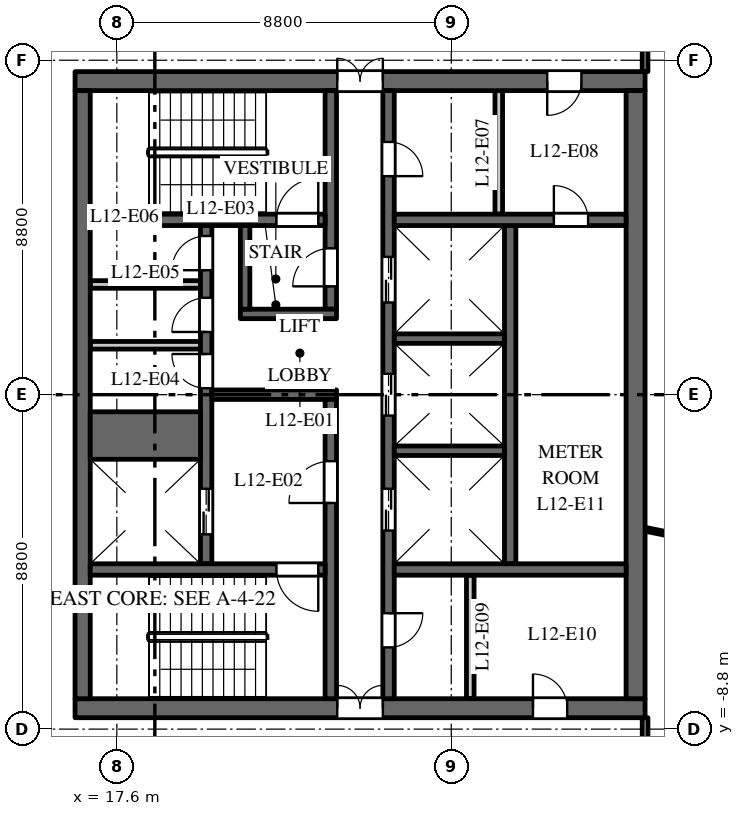
"""IFC4 building model, lengths in metres.
Left out: names, types, materials, properties, quantities, classifications, styles, units other than length and angle.
Written with IfcOpenShell. Run it as: python <this file> out.ifc"""

import sys

from ifc_helpers import new_model, si_unit, direction, frame, frame_2d, origin, place, context, subcontext, project, spatial, rectangle, extrude, element, fill, save


model = new_model("IFC4")
c1 = context("Model", 3, precision=1e-05, world=origin(), true_north=direction((0.0, 1.0)))
c2 = subcontext(c1, "Body", "Model", "MODEL_VIEW")
j1 = project(units=[si_unit("LENGTHUNIT", "METRE"), si_unit("PLANEANGLEUNIT", "RADIAN")], contexts=[c1])
p1 = place(None, origin())
s1 = spatial("IfcSite", under=j1, at=p1, CompositionType="ELEMENT")
p2 = place(p1, origin())
s2 = spatial("IfcBuilding", under=s1, at=p2, CompositionType="ELEMENT")
p3 = place(p2, frame((0.0, 0.0, 58.5)))
s3 = spatial("IfcBuildingStorey", under=s2, at=p3, CompositionType="ELEMENT", Elevation=58.5)
p4 = place(p3, frame((16.5, 8.25, 0.0), z_axis=(0.0, 0.0, 1.0), x_axis=(1.0, 0.0, 0.0)))
e1 = element("IfcWall", 1, at=p4, inside=s3, PredefinedType="SHEAR", context=c2, shape_type="SweptSolid", body=[
    extrude(rectangle(XDim=15.0, YDim=0.5, at=frame_2d((7.5, 0.0))), origin(), (0.0, 0.0, 1.0), 3.7),
])
p5 = place(p4, frame((6.9, 0.0, 0.0)))
e2 = element("IfcOpeningElement", 2, at=p5, cuts=e1, PredefinedType="OPENING", context=c2, shape_type="SweptSolid", body=[
    extrude(rectangle(XDim=1.2, YDim=2.1, at=frame_2d((0.6, 1.05))), frame((0.0, 0.26, 0.0), z_axis=(0.0, -1.0, 0.0), x_axis=(1.0, 0.0, 0.0)), (0.0, 0.0, 1.0), 0.52),
])
p6 = place(p4, frame((12.425, 0.0, 0.0)))
e3 = element("IfcOpeningElement", 3, at=p6, cuts=e1, PredefinedType="OPENING", context=c2, shape_type="SweptSolid", body=[
    extrude(rectangle(XDim=0.9, YDim=2.1, at=frame_2d((0.45, 1.05))), frame((0.0, 0.26, 0.0), z_axis=(0.0, -1.0, 0.0), x_axis=(1.0, 0.0, 0.0)), (0.0, 0.0, 1.0), 0.52),
])
p7 = place(p3, frame((16.5, -8.25, 0.0), z_axis=(0.0, 0.0, 1.0), x_axis=(1.0, 0.0, 0.0)))
e4 = element("IfcWall", 4, at=p7, inside=s3, PredefinedType="SHEAR", context=c2, shape_type="SweptSolid", body=[
    extrude(rectangle(XDim=15.0, YDim=0.5, at=frame_2d((7.5, 0.0))), origin(), (0.0, 0.0, 1.0), 3.7),
])
p8 = place(p7, frame((6.9, 0.0, 0.0)))
e5 = element("IfcOpeningElement", 5, at=p8, cuts=e4, PredefinedType="OPENING", context=c2, shape_type="SweptSolid", body=[
    extrude(rectangle(XDim=1.2, YDim=2.1, at=frame_2d((0.6, 1.05))), frame((0.0, 0.26, 0.0), z_axis=(0.0, -1.0, 0.0), x_axis=(1.0, 0.0, 0.0)), (0.0, 0.0, 1.0), 0.52),
])
p9 = place(p7, frame((12.05, 0.0, 0.0)))
e6 = element("IfcOpeningElement", 6, at=p9, cuts=e4, PredefinedType="OPENING", context=c2, shape_type="SweptSolid", body=[
    extrude(rectangle(XDim=0.9, YDim=2.1, at=frame_2d((0.45, 1.05))), frame((0.0, 0.26, 0.0), z_axis=(0.0, -1.0, 0.0), x_axis=(1.0, 0.0, 0.0)), (0.0, 0.0, 1.0), 0.52),
])
for number, where, z_axis, x_axis in (
    (7, (16.9, 1.3, 0.0), (0.0, 0.0, 1.0), (1.0, 0.0, 0.0)),
    (8, (16.9, 2.9, 0.0), (0.0, 0.0, 1.0), (1.0, 0.0, 0.0)),
):
    element("IfcWall", number, at=place(p3, frame(where, z_axis=z_axis, x_axis=x_axis)), inside=s3, PredefinedType="PARTITIONING", context=c2, shape_type="SweptSolid", body=[
        extrude(rectangle(XDim=2.9, YDim=0.2, at=frame_2d((1.45, 0.0))), origin(), (0.0, 0.0, 1.0), 3.7),
    ])
p10 = place(p3, frame((27.95, -4.45, 0.0), z_axis=(0.0, 0.0, 1.0), x_axis=(0.0, 1.0, 0.0)))
e9 = element("IfcWall", 9, at=p10, inside=s3, PredefinedType="SHEAR", context=c2, shape_type="SweptSolid", body=[
    extrude(rectangle(XDim=8.9, YDim=0.3, at=frame_2d((4.45, 0.0))), origin(), (0.0, 0.0, 1.0), 3.7),
])
p11 = place(p3, frame((19.95, -4.45, 0.0), z_axis=(0.0, 0.0, 1.0), x_axis=(0.0, 1.0, 0.0)))
e10 = element("IfcWall", 10, at=p11, inside=s3, PredefinedType="SHEAR", context=c2, shape_type="SweptSolid", body=[
    extrude(rectangle(XDim=8.9, YDim=0.3, at=frame_2d((4.45, 0.0))), origin(), (0.0, 0.0, 1.0), 3.7),
])
p12 = place(p11, frame((0.775, 0.0, 0.0)))
e11 = element("IfcOpeningElement", 11, at=p12, cuts=e10, PredefinedType="OPENING", context=c2, shape_type="SweptSolid", body=[
    extrude(rectangle(XDim=1.2, YDim=2.1, at=frame_2d((0.6, 1.05))), frame((0.0, 0.16, 0.0), z_axis=(0.0, -1.0, 0.0), x_axis=(1.0, 0.0, 0.0)), (0.0, 0.0, 1.0), 0.32),
])
p13 = place(p11, frame((4.62, 0.0, 0.0)))
e12 = element("IfcOpeningElement", 12, at=p13, cuts=e10, PredefinedType="OPENING", context=c2, shape_type="SweptSolid", body=[
    extrude(rectangle(XDim=0.9, YDim=2.1, at=frame_2d((0.45, 1.05))), frame((0.0, 0.16, 0.0), z_axis=(0.0, -1.0, 0.0), x_axis=(1.0, 0.0, 0.0)), (0.0, 0.0, 1.0), 0.32),
])
p14 = place(p11, frame((6.1, 0.0, 0.0)))
e13 = element("IfcOpeningElement", 13, at=p14, cuts=e10, PredefinedType="OPENING", context=c2, shape_type="SweptSolid", body=[
    extrude(rectangle(XDim=0.9, YDim=2.1, at=frame_2d((0.45, 1.05))), frame((0.0, 0.16, 0.0), z_axis=(0.0, -1.0, 0.0), x_axis=(1.0, 0.0, 0.0)), (0.0, 0.0, 1.0), 0.32),
])
p15 = place(p11, frame((7.725, 0.0, 0.0)))
e14 = element("IfcOpeningElement", 14, at=p15, cuts=e10, PredefinedType="OPENING", context=c2, shape_type="SweptSolid", body=[
    extrude(rectangle(XDim=0.9, YDim=2.1, at=frame_2d((0.45, 1.05))), frame((0.0, 0.16, 0.0), z_axis=(0.0, -1.0, 0.0), x_axis=(1.0, 0.0, 0.0)), (0.0, 0.0, 1.0), 0.32),
])
p16 = place(p3, frame((24.75, -8.0, 0.0), z_axis=(0.0, 0.0, 1.0), x_axis=(0.0, 1.0, 0.0)))
e15 = element("IfcWall", 15, at=p16, inside=s3, PredefinedType="SHEAR", context=c2, shape_type="SweptSolid", body=[
    extrude(rectangle(XDim=16.0, YDim=0.3, at=frame_2d((8.0, 0.0))), origin(), (0.0, 0.0, 1.0), 3.7),
])
p17 = place(p16, frame((4.425, 0.0, 0.0)))
e16 = element("IfcOpeningElement", 16, at=p17, cuts=e15, PredefinedType="OPENING", context=c2, shape_type="SweptSolid", body=[
    extrude(rectangle(XDim=1.1, YDim=2.1, at=frame_2d((0.55, 1.05))), frame((0.0, 0.16, 0.0), z_axis=(0.0, -1.0, 0.0), x_axis=(1.0, 0.0, 0.0)), (0.0, 0.0, 1.0), 0.32),
])
p18 = place(p16, frame((7.45, 0.0, 0.0)))
e17 = element("IfcOpeningElement", 17, at=p18, cuts=e15, PredefinedType="OPENING", context=c2, shape_type="SweptSolid", body=[
    extrude(rectangle(XDim=1.1, YDim=2.1, at=frame_2d((0.55, 1.05))), frame((0.0, 0.16, 0.0), z_axis=(0.0, -1.0, 0.0), x_axis=(1.0, 0.0, 0.0)), (0.0, 0.0, 1.0), 0.32),
])
p19 = place(p16, frame((10.425, 0.0, 0.0)))
e18 = element("IfcOpeningElement", 18, at=p19, cuts=e15, PredefinedType="OPENING", context=c2, shape_type="SweptSolid", body=[
    extrude(rectangle(XDim=1.2, YDim=2.1, at=frame_2d((0.6, 1.05))), frame((0.0, 0.16, 0.0), z_axis=(0.0, -1.0, 0.0), x_axis=(1.0, 0.0, 0.0)), (0.0, 0.0, 1.0), 0.32),
])
p20 = place(p16, frame((13.75, 0.0, 0.0)))
e19 = element("IfcOpeningElement", 19, at=p20, cuts=e15, PredefinedType="OPENING", context=c2, shape_type="SweptSolid", body=[
    extrude(rectangle(XDim=0.9, YDim=2.1, at=frame_2d((0.45, 1.05))), frame((0.0, 0.16, 0.0), z_axis=(0.0, -1.0, 0.0), x_axis=(1.0, 0.0, 0.0)), (0.0, 0.0, 1.0), 0.32),
])
p21 = place(p16, frame((1.35, 0.0, 0.0)))
e20 = element("IfcOpeningElement", 20, at=p21, cuts=e15, PredefinedType="OPENING", context=c2, shape_type="SweptSolid", body=[
    extrude(rectangle(XDim=0.9, YDim=2.1, at=frame_2d((0.45, 1.05))), frame((0.0, 0.16, 0.0), z_axis=(0.0, -1.0, 0.0), x_axis=(1.0, 0.0, 0.0)), (0.0, 0.0, 1.0), 0.32),
])
p22 = place(p3, frame((20.1, 0.0, 0.0), z_axis=(0.0, 0.0, 1.0), x_axis=(1.0, 0.0, 0.0)))
e21 = element("IfcWall", 21, at=p22, inside=s3, PredefinedType="SHEAR", context=c2, shape_type="SweptSolid", body=[
    extrude(rectangle(XDim=3.28, YDim=0.25, at=frame_2d((1.64, 0.0))), origin(), (0.0, 0.0, 1.0), 3.7),
])
p23 = place(p3, frame((16.7, -8.0, 0.0), z_axis=(0.0, 0.0, 1.0), x_axis=(0.0, 1.0, 0.0)))
e22 = element("IfcWall", 22, at=p23, inside=s3, PredefinedType="SHEAR", context=c2, shape_type="SweptSolid", body=[
    extrude(rectangle(XDim=16.0, YDim=0.4, at=frame_2d((8.0, 0.0))), origin(), (0.0, 0.0, 1.0), 3.7),
])
p24 = place(p3, frame((31.25, -8.0, 0.0), z_axis=(0.0, 0.0, 1.0), x_axis=(0.0, 1.0, 0.0)))
e23 = element("IfcWall", 23, at=p24, inside=s3, PredefinedType="SHEAR", context=c2, shape_type="SweptSolid", body=[
    extrude(rectangle(XDim=16.0, YDim=0.5, at=frame_2d((8.0, 0.0))), origin(), (0.0, 0.0, 1.0), 3.7),
])
p25 = place(p3, frame((24.9, 4.6, 0.0), z_axis=(0.0, 0.0, 1.0), x_axis=(1.0, 0.0, 0.0)))
e24 = element("IfcWall", 24, at=p25, inside=s3, PredefinedType="SHEAR", context=c2, shape_type="SweptSolid", body=[
    extrude(rectangle(XDim=6.1, YDim=0.3, at=frame_2d((3.05, 0.0))), origin(), (0.0, 0.0, 1.0), 3.7),
])
p26 = place(p25, frame((4.2, 0.0, 0.0)))
e25 = element("IfcOpeningElement", 25, at=p26, cuts=e24, PredefinedType="OPENING", context=c2, shape_type="SweptSolid", body=[
    extrude(rectangle(XDim=0.9, YDim=2.1, at=frame_2d((0.45, 1.05))), frame((0.0, 0.16, 0.0), z_axis=(0.0, -1.0, 0.0), x_axis=(1.0, 0.0, 0.0)), (0.0, 0.0, 1.0), 0.32),
])
for number, where, z_axis, x_axis in (
    (26, (27.65, 4.75, 0.0), (0.0, 0.0, 1.0), (0.0, 1.0, 0.0)),
    (27, (26.9, -8.0, 0.0), (0.0, 0.0, 1.0), (0.0, 1.0, 0.0)),
):
    element("IfcWall", number, at=place(p3, frame(where, z_axis=z_axis, x_axis=x_axis)), inside=s3, PredefinedType="PARTITIONING", context=c2, shape_type="SweptSolid", body=[
        extrude(rectangle(XDim=3.25, YDim=0.2, at=frame_2d((1.625, 0.0))), origin(), (0.0, 0.0, 1.0), 3.7),
    ])
p27 = place(p3, frame((24.9, -4.6, 0.0), z_axis=(0.0, 0.0, 1.0), x_axis=(1.0, 0.0, 0.0)))
e28 = element("IfcWall", 28, at=p27, inside=s3, PredefinedType="SHEAR", context=c2, shape_type="SweptSolid", body=[
    extrude(rectangle(XDim=6.1, YDim=0.3, at=frame_2d((3.05, 0.0))), origin(), (0.0, 0.0, 1.0), 3.7),
])
p28 = place(p3, frame((16.9, -1.075, 0.0), z_axis=(0.0, 0.0, 1.0), x_axis=(1.0, 0.0, 0.0)))
e29 = element("IfcWall", 29, at=p28, inside=s3, PredefinedType="SHEAR", context=c2, shape_type="SweptSolid", body=[
    extrude(rectangle(XDim=2.9, YDim=1.25, at=frame_2d((1.45, 0.0))), origin(), (0.0, 0.0, 1.0), 3.7),
])
for number, where, z_axis, x_axis in (
    (30, (24.9, -1.475, 0.0), (0.0, 0.0, 1.0), (1.0, 0.0, 0.0)),
    (31, (24.9, 1.475, 0.0), (0.0, 0.0, 1.0), (1.0, 0.0, 0.0)),
):
    element("IfcWall", number, at=place(p3, frame(where, z_axis=z_axis, x_axis=x_axis)), inside=s3, PredefinedType="SHEAR", context=c2, shape_type="SweptSolid", body=[
        extrude(rectangle(XDim=2.9, YDim=0.25, at=frame_2d((1.45, 0.0))), origin(), (0.0, 0.0, 1.0), 3.7),
    ])
p29 = place(p3, frame((23.23, 2.25, 0.0), z_axis=(0.0, 0.0, 1.0), x_axis=(0.0, 1.0, 0.0)))
e32 = element("IfcWall", 32, at=p29, inside=s3, PredefinedType="SHEAR", context=c2, shape_type="SweptSolid", body=[
    extrude(rectangle(XDim=5.75, YDim=0.3, at=frame_2d((2.875, 0.0))), origin(), (0.0, 0.0, 1.0), 3.7),
])
p30 = place(p29, frame((0.6, 0.0, 0.0)))
e33 = element("IfcOpeningElement", 33, at=p30, cuts=e32, PredefinedType="OPENING", context=c2, shape_type="SweptSolid", body=[
    extrude(rectangle(XDim=1.0, YDim=2.1, at=frame_2d((0.5, 1.05))), frame((0.0, 0.16, 0.0), z_axis=(0.0, -1.0, 0.0), x_axis=(1.0, 0.0, 0.0)), (0.0, 0.0, 1.0), 0.32),
])
p31 = place(p3, frame((23.23, -8.0, 0.0), z_axis=(0.0, 0.0, 1.0), x_axis=(0.0, 1.0, 0.0)))
e34 = element("IfcWall", 34, at=p31, inside=s3, PredefinedType="SHEAR", context=c2, shape_type="SweptSolid", body=[
    extrude(rectangle(XDim=7.875, YDim=0.3, at=frame_2d((3.938, 0.0))), origin(), (0.0, 0.0, 1.0), 3.7),
])
p32 = place(p31, frame((5.15, 0.0, 0.0)))
e35 = element("IfcOpeningElement", 35, at=p32, cuts=e34, PredefinedType="OPENING", context=c2, shape_type="SweptSolid", body=[
    extrude(rectangle(XDim=1.1, YDim=2.1, at=frame_2d((0.55, 1.05))), frame((0.0, 0.16, 0.0), z_axis=(0.0, -1.0, 0.0), x_axis=(1.0, 0.0, 0.0)), (0.0, 0.0, 1.0), 0.32),
])
p33 = place(p3, frame((16.9, 4.6, 0.0), z_axis=(0.0, 0.0, 1.0), x_axis=(1.0, 0.0, 0.0)))
e36 = element("IfcWall", 36, at=p33, inside=s3, PredefinedType="SHEAR", context=c2, shape_type="SweptSolid", body=[
    extrude(rectangle(XDim=6.18, YDim=0.3, at=frame_2d((3.09, 0.0))), origin(), (0.0, 0.0, 1.0), 3.7),
])
p34 = place(p33, frame((4.9, 0.0, 0.0)))
e37 = element("IfcOpeningElement", 37, at=p34, cuts=e36, PredefinedType="OPENING", context=c2, shape_type="SweptSolid", body=[
    extrude(rectangle(XDim=1.1, YDim=2.1, at=frame_2d((0.55, 1.05))), frame((0.0, 0.16, 0.0), z_axis=(0.0, -1.0, 0.0), x_axis=(1.0, 0.0, 0.0)), (0.0, 0.0, 1.0), 0.32),
])
p35 = place(p3, frame((16.9, -4.6, 0.0), z_axis=(0.0, 0.0, 1.0), x_axis=(1.0, 0.0, 0.0)))
e38 = element("IfcWall", 38, at=p35, inside=s3, PredefinedType="SHEAR", context=c2, shape_type="SweptSolid", body=[
    extrude(rectangle(XDim=6.18, YDim=0.3, at=frame_2d((3.09, 0.0))), origin(), (0.0, 0.0, 1.0), 3.7),
])
p36 = place(p35, frame((4.9, 0.0, 0.0)))
e39 = element("IfcOpeningElement", 39, at=p36, cuts=e38, PredefinedType="OPENING", context=c2, shape_type="SweptSolid", body=[
    extrude(rectangle(XDim=1.1, YDim=2.1, at=frame_2d((0.55, 1.05))), frame((0.0, 0.16, 0.0), z_axis=(0.0, -1.0, 0.0), x_axis=(1.0, 0.0, 0.0)), (0.0, 0.0, 1.0), 0.32),
])
p37 = place(p3, frame((20.85, 2.125, 0.0), z_axis=(0.0, 0.0, 1.0), x_axis=(1.0, 0.0, 0.0)))
e40 = element("IfcWall", 40, at=p37, inside=s3, PredefinedType="SHEAR", context=c2, shape_type="SweptSolid", body=[
    extrude(rectangle(XDim=2.53, YDim=0.25, at=frame_2d((1.265, 0.0))), origin(), (0.0, 0.0, 1.0), 3.7),
])
p38 = place(p3, frame((20.975, 2.25, 0.0), z_axis=(0.0, 0.0, 1.0), x_axis=(0.0, 1.0, 0.0)))
e41 = element("IfcWall", 41, at=p38, inside=s3, PredefinedType="SHEAR", context=c2, shape_type="SweptSolid", body=[
    extrude(rectangle(XDim=2.2, YDim=0.25, at=frame_2d((1.1, 0.0))), origin(), (0.0, 0.0, 1.0), 3.7),
])
p39 = place(p3, frame((31.5, -10.7, 0.0), z_axis=(0.0, 0.0, 1.0), x_axis=(0.0, 1.0, 0.0)))
e42 = element("IfcWall", 42, at=p39, inside=s3, PredefinedType="PARTITIONING", context=c2, shape_type="SweptSolid", body=[
    extrude(rectangle(XDim=2.2, YDim=0.15, at=frame_2d((1.1, 0.0))), origin(), (0.0, 0.0, 1.0), 2.85),
])
p40 = place(p3, frame((31.5, -3.542, 0.0), z_axis=(0.0, 0.0, 1.0), x_axis=(0.980357474535, -0.197228857227, 0.0)))
e43 = element("IfcWall", 43, at=p40, inside=s3, PredefinedType="PARTITIONING", context=c2, shape_type="SweptSolid", body=[
    extrude(rectangle(XDim=4.092, YDim=0.1, at=frame_2d((2.046, 0.0))), origin(), (0.0, 0.0, 1.0), 2.85),
])
p41 = place(p3, frame((31.5, 8.5, 0.0), z_axis=(0.0, 0.0, 1.0), x_axis=(0.0, 1.0, 0.0)))
e44 = element("IfcWall", 44, at=p41, inside=s3, PredefinedType="PARTITIONING", context=c2, shape_type="SweptSolid", body=[
    extrude(rectangle(XDim=2.2, YDim=0.15, at=frame_2d((1.1, 0.0))), origin(), (0.0, 0.0, 1.0), 2.85),
])
p42 = place(p41, frame((0.65, 0.0, 0.0)))
e45 = element("IfcOpeningElement", 45, at=p42, cuts=e44, PredefinedType="OPENING", context=c2, shape_type="SweptSolid", body=[
    extrude(rectangle(XDim=1.0, YDim=2.1, at=frame_2d((0.5, 1.05))), frame((0.0, 0.085, 0.0), z_axis=(0.0, -1.0, 0.0), x_axis=(1.0, 0.0, 0.0)), (0.0, 0.0, 1.0), 0.17),
])
p43 = place(p12, origin())
e46 = element("IfcDoor", 46, at=p43, inside=s3, OperationType="DOUBLE_DOOR_SLIDING", PredefinedType="DOOR", context=c2, shape_type="SweptSolid", body=[
    extrude(rectangle(XDim=1.2, YDim=2.1, at=frame_2d((0.6, 1.05))), frame((0.0, 0.025, 0.0), z_axis=(0.0, -1.0, 0.0), x_axis=(1.0, 0.0, 0.0)), (0.0, 0.0, 1.0), 0.05),
])
fill(e11, e46)
p44 = place(p17, origin())
e47 = element("IfcDoor", 47, at=p44, inside=s3, OperationType="DOUBLE_DOOR_SLIDING", PredefinedType="DOOR", context=c2, shape_type="SweptSolid", body=[
    extrude(rectangle(XDim=1.1, YDim=2.1, at=frame_2d((0.55, 1.05))), frame((0.0, 0.025, 0.0), z_axis=(0.0, -1.0, 0.0), x_axis=(1.0, 0.0, 0.0)), (0.0, 0.0, 1.0), 0.05),
])
fill(e16, e47)
p45 = place(p18, origin())
e48 = element("IfcDoor", 48, at=p45, inside=s3, OperationType="DOUBLE_DOOR_SLIDING", PredefinedType="DOOR", context=c2, shape_type="SweptSolid", body=[
    extrude(rectangle(XDim=1.1, YDim=2.1, at=frame_2d((0.55, 1.05))), frame((0.0, 0.025, 0.0), z_axis=(0.0, -1.0, 0.0), x_axis=(1.0, 0.0, 0.0)), (0.0, 0.0, 1.0), 0.05),
])
fill(e17, e48)
p46 = place(p19, origin())
e49 = element("IfcDoor", 49, at=p46, inside=s3, OperationType="DOUBLE_DOOR_SLIDING", PredefinedType="DOOR", context=c2, shape_type="SweptSolid", body=[
    extrude(rectangle(XDim=1.2, YDim=2.1, at=frame_2d((0.6, 1.05))), frame((0.0, 0.025, 0.0), z_axis=(0.0, -1.0, 0.0), x_axis=(1.0, 0.0, 0.0)), (0.0, 0.0, 1.0), 0.05),
])
fill(e18, e49)
p47 = place(p34, origin())
e50 = element("IfcDoor", 50, at=p47, inside=s3, OperationType="SINGLE_SWING_LEFT", PredefinedType="DOOR", context=c2, shape_type="SweptSolid", body=[
    extrude(rectangle(XDim=1.1, YDim=2.1, at=frame_2d((0.55, 1.05))), frame((0.0, 0.025, 0.0), z_axis=(0.0, -1.0, 0.0), x_axis=(1.0, 0.0, 0.0)), (0.0, 0.0, 1.0), 0.05),
])
fill(e37, e50)
p48 = place(p36, origin())
e51 = element("IfcDoor", 51, at=p48, inside=s3, OperationType="SINGLE_SWING_RIGHT", PredefinedType="DOOR", context=c2, shape_type="SweptSolid", body=[
    extrude(rectangle(XDim=1.1, YDim=2.1, at=frame_2d((0.55, 1.05))), frame((0.0, 0.025, 0.0), z_axis=(0.0, -1.0, 0.0), x_axis=(1.0, 0.0, 0.0)), (0.0, 0.0, 1.0), 0.05),
])
fill(e39, e51)
p49 = place(p32, origin())
e52 = element("IfcDoor", 52, at=p49, inside=s3, OperationType="SINGLE_SWING_RIGHT", PredefinedType="DOOR", context=c2, shape_type="SweptSolid", body=[
    extrude(rectangle(XDim=1.1, YDim=2.1, at=frame_2d((0.55, 1.05))), frame((0.0, 0.025, 0.0), z_axis=(0.0, -1.0, 0.0), x_axis=(1.0, 0.0, 0.0)), (0.0, 0.0, 1.0), 0.05),
])
fill(e35, e52)
p50 = place(p30, origin())
e53 = element("IfcDoor", 53, at=p50, inside=s3, OperationType="SINGLE_SWING_RIGHT", PredefinedType="DOOR", context=c2, shape_type="SweptSolid", body=[
    extrude(rectangle(XDim=1.0, YDim=2.1, at=frame_2d((0.5, 1.05))), frame((0.0, 0.025, 0.0), z_axis=(0.0, -1.0, 0.0), x_axis=(1.0, 0.0, 0.0)), (0.0, 0.0, 1.0), 0.05),
])
fill(e33, e53)
p51 = place(p5, origin())
e54 = element("IfcDoor", 54, at=p51, inside=s3, OperationType="DOUBLE_DOOR_DOUBLE_SWING", PredefinedType="DOOR", context=c2, shape_type="SweptSolid", body=[
    extrude(rectangle(XDim=1.2, YDim=2.1, at=frame_2d((0.6, 1.05))), frame((0.0, 0.025, 0.0), z_axis=(0.0, -1.0, 0.0), x_axis=(1.0, 0.0, 0.0)), (0.0, 0.0, 1.0), 0.05),
])
fill(e2, e54)
p52 = place(p8, origin())
e55 = element("IfcDoor", 55, at=p52, inside=s3, OperationType="DOUBLE_DOOR_DOUBLE_SWING", PredefinedType="DOOR", context=c2, shape_type="SweptSolid", body=[
    extrude(rectangle(XDim=1.2, YDim=2.1, at=frame_2d((0.6, 1.05))), frame((0.0, 0.025, 0.0), z_axis=(0.0, -1.0, 0.0), x_axis=(1.0, 0.0, 0.0)), (0.0, 0.0, 1.0), 0.05),
])
fill(e5, e55)
p53 = place(p13, origin())
e56 = element("IfcDoor", 56, at=p53, inside=s3, OperationType="SINGLE_SWING_LEFT", PredefinedType="DOOR", context=c2, shape_type="SweptSolid", body=[
    extrude(rectangle(XDim=0.9, YDim=2.1, at=frame_2d((0.45, 1.05))), frame((0.0, 0.025, 0.0), z_axis=(0.0, -1.0, 0.0), x_axis=(1.0, 0.0, 0.0)), (0.0, 0.0, 1.0), 0.05),
])
fill(e12, e56)
p54 = place(p14, origin())
e57 = element("IfcDoor", 57, at=p54, inside=s3, OperationType="SINGLE_SWING_RIGHT", PredefinedType="DOOR", context=c2, shape_type="SweptSolid", body=[
    extrude(rectangle(XDim=0.9, YDim=2.1, at=frame_2d((0.45, 1.05))), frame((0.0, 0.025, 0.0), z_axis=(0.0, -1.0, 0.0), x_axis=(1.0, 0.0, 0.0)), (0.0, 0.0, 1.0), 0.05),
])
fill(e13, e57)
p55 = place(p15, origin())
e58 = element("IfcDoor", 58, at=p55, inside=s3, OperationType="SINGLE_SWING_RIGHT", PredefinedType="DOOR", context=c2, shape_type="SweptSolid", body=[
    extrude(rectangle(XDim=0.9, YDim=2.1, at=frame_2d((0.45, 1.05))), frame((0.0, 0.025, 0.0), z_axis=(0.0, -1.0, 0.0), x_axis=(1.0, 0.0, 0.0)), (0.0, 0.0, 1.0), 0.05),
])
fill(e14, e58)
p56 = place(p20, origin())
e59 = element("IfcDoor", 59, at=p56, inside=s3, OperationType="SINGLE_SWING_LEFT", PredefinedType="DOOR", context=c2, shape_type="SweptSolid", body=[
    extrude(rectangle(XDim=0.9, YDim=2.1, at=frame_2d((0.45, 1.05))), frame((0.0, 0.025, 0.0), z_axis=(0.0, -1.0, 0.0), x_axis=(1.0, 0.0, 0.0)), (0.0, 0.0, 1.0), 0.05),
])
fill(e19, e59)
p57 = place(p6, origin())
e60 = element("IfcDoor", 60, at=p57, inside=s3, OperationType="SINGLE_SWING_LEFT", PredefinedType="DOOR", context=c2, shape_type="SweptSolid", body=[
    extrude(rectangle(XDim=0.9, YDim=2.1, at=frame_2d((0.45, 1.05))), frame((0.0, 0.025, 0.0), z_axis=(0.0, -1.0, 0.0), x_axis=(1.0, 0.0, 0.0)), (0.0, 0.0, 1.0), 0.05),
])
fill(e3, e60)
p58 = place(p21, origin())
e61 = element("IfcDoor", 61, at=p58, inside=s3, OperationType="SINGLE_SWING_RIGHT", PredefinedType="DOOR", context=c2, shape_type="SweptSolid", body=[
    extrude(rectangle(XDim=0.9, YDim=2.1, at=frame_2d((0.45, 1.05))), frame((0.0, 0.025, 0.0), z_axis=(0.0, -1.0, 0.0), x_axis=(1.0, 0.0, 0.0)), (0.0, 0.0, 1.0), 0.05),
])
fill(e20, e61)
p59 = place(p9, origin())
e62 = element("IfcDoor", 62, at=p59, inside=s3, OperationType="SINGLE_SWING_RIGHT", PredefinedType="DOOR", context=c2, shape_type="SweptSolid", body=[
    extrude(rectangle(XDim=0.9, YDim=2.1, at=frame_2d((0.45, 1.05))), frame((0.0, 0.025, 0.0), z_axis=(0.0, -1.0, 0.0), x_axis=(1.0, 0.0, 0.0)), (0.0, 0.0, 1.0), 0.05),
])
fill(e6, e62)
p60 = place(p26, origin())
e63 = element("IfcDoor", 63, at=p60, inside=s3, OperationType="SINGLE_SWING_RIGHT", PredefinedType="DOOR", context=c2, shape_type="SweptSolid", body=[
    extrude(rectangle(XDim=0.9, YDim=2.1, at=frame_2d((0.45, 1.05))), frame((0.0, 0.025, 0.0), z_axis=(0.0, -1.0, 0.0), x_axis=(1.0, 0.0, 0.0)), (0.0, 0.0, 1.0), 0.05),
])
fill(e25, e63)
save(model, sys.argv[1])
